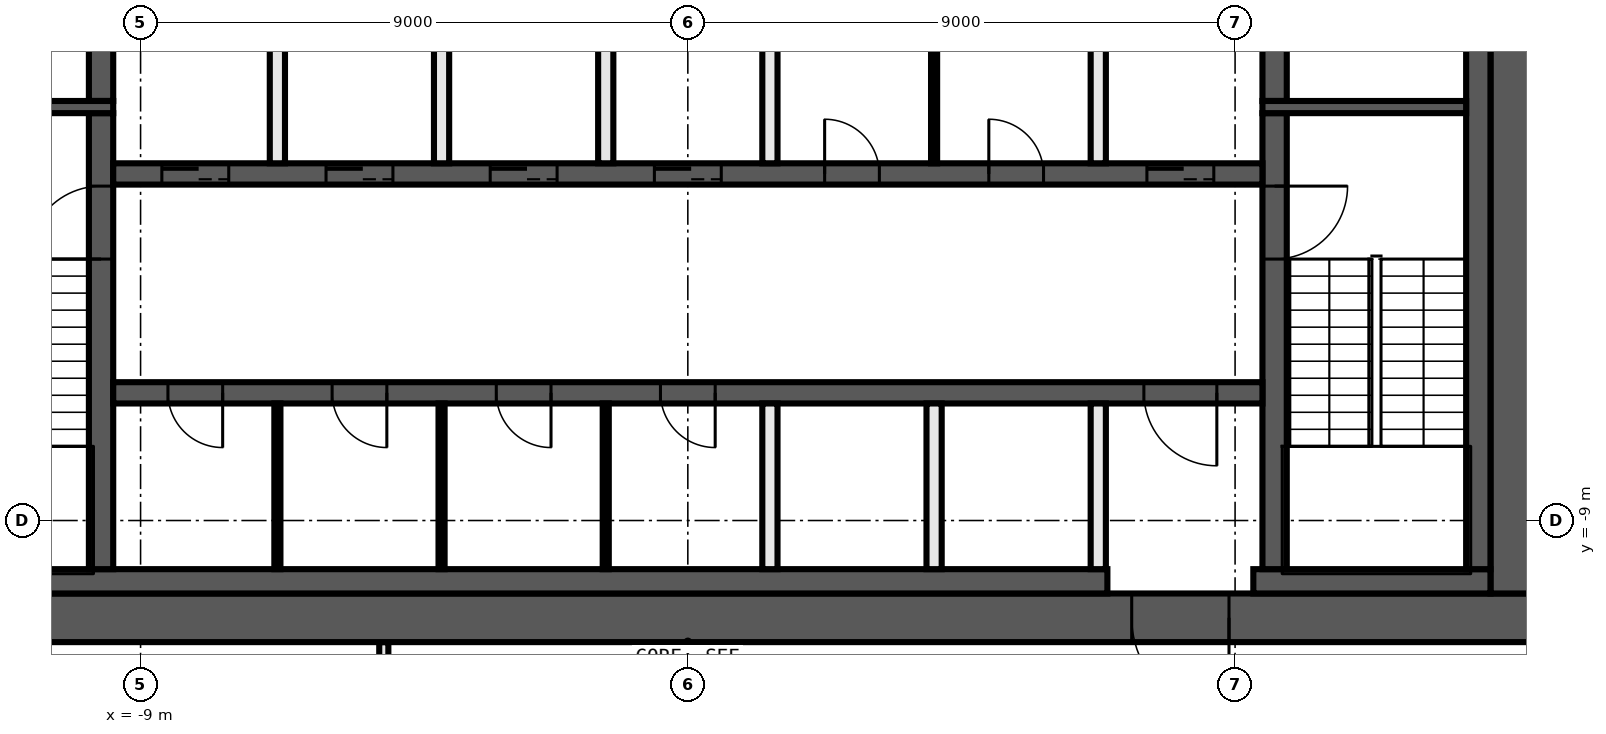
"""IFC4 building model, lengths in metres.
Left out: names, types, materials, properties, quantities, classifications, styles, units other than length and angle.
Written with IfcOpenShell. Run it as: python <this file> out.ifc"""

import sys

from ifc_helpers import new_model, si_unit, direction, frame, frame_2d, origin, place, context, subcontext, project, spatial, rectangle, extrude, element, fill, save


model = new_model("IFC4")
c1 = context("Model", 3, precision=1e-05, world=origin(), true_north=direction((0.0, 1.0)))
c2 = subcontext(c1, "Body", "Model", "MODEL_VIEW")
j1 = project(units=[si_unit("LENGTHUNIT", "METRE"), si_unit("PLANEANGLEUNIT", "RADIAN")], contexts=[c1])
p1 = place(None, origin())
s1 = spatial("IfcSite", under=j1, at=p1, CompositionType="ELEMENT")
p2 = place(p1, origin())
s2 = spatial("IfcBuilding", under=s1, at=p2, CompositionType="ELEMENT")
p3 = place(p2, frame((0.0, 0.0, 207.2)))
s3 = spatial("IfcBuildingStorey", under=s2, at=p3, CompositionType="ELEMENT", Elevation=207.2)
p4 = place(p3, frame((-5.0, -14.125, 0.0), z_axis=(0.0, 0.0, 1.0), x_axis=(0.0, 1.0, 0.0)))
e1 = element("IfcWall", 1, at=p4, inside=s3, PredefinedType="PARTITIONING", context=c2, shape_type="SweptSolid", body=[
    extrude(rectangle(XDim=3.125, YDim=0.15, at=frame_2d((1.562, 0.0))), origin(), (0.0, 0.0, 1.0), 3.82),
])
p5 = place(p3, frame((14.0, -10.6, 0.0), z_axis=(0.0, 0.0, 1.0), x_axis=(-1.0, 0.0, 0.0)))
e2 = element("IfcWall", 2, at=p5, inside=s3, PredefinedType="SHEAR", context=c2, shape_type="SweptSolid", body=[
    extrude(rectangle(XDim=28.0, YDim=0.8, at=frame_2d((14.0, 0.0))), origin(), (0.0, 0.0, 1.0), 3.82),
])
p6 = place(p5, frame((5.1, 0.0, 0.0)))
e3 = element("IfcOpeningElement", 3, at=p6, cuts=e2, PredefinedType="OPENING", context=c2, shape_type="SweptSolid", body=[
    extrude(rectangle(XDim=1.6, YDim=2.1, at=frame_2d((0.8, 1.05))), frame((0.0, 0.41, 0.0), z_axis=(0.0, -1.0, 0.0), x_axis=(1.0, 0.0, 0.0)), (0.0, 0.0, 1.0), 0.82),
])
p7 = place(p3, frame((13.6, 10.2, 0.0), z_axis=(0.0, 0.0, 1.0), x_axis=(0.0, -1.0, 0.0)))
e4 = element("IfcWall", 4, at=p7, inside=s3, PredefinedType="SHEAR", context=c2, shape_type="SweptSolid", body=[
    extrude(rectangle(XDim=20.4, YDim=0.8, at=frame_2d((10.2, 0.0))), origin(), (0.0, 0.0, 1.0), 3.82),
])
p8 = place(p3, frame((13.2, -10.0, 0.0), z_axis=(0.0, 0.0, 1.0), x_axis=(-1.0, 0.0, 0.0)))
e5 = element("IfcWall", 5, at=p8, inside=s3, PredefinedType="SHEAR", context=c2, shape_type="SweptSolid", body=[
    extrude(rectangle(XDim=3.9, YDim=0.4, at=frame_2d((1.95, 0.0))), origin(), (0.0, 0.0, 1.0), 3.82),
])
p9 = place(p3, frame((6.9, -10.0, 0.0), z_axis=(0.0, 0.0, 1.0), x_axis=(-1.0, 0.0, 0.0)))
e6 = element("IfcWall", 6, at=p9, inside=s3, PredefinedType="SHEAR", context=c2, shape_type="SweptSolid", body=[
    extrude(rectangle(XDim=20.1, YDim=0.4, at=frame_2d((10.05, 0.0))), origin(), (0.0, 0.0, 1.0), 3.82),
])
p10 = place(p3, frame((13.0, 9.8, 0.0), z_axis=(0.0, 0.0, 1.0), x_axis=(0.0, -1.0, 0.0)))
e7 = element("IfcWall", 7, at=p10, inside=s3, PredefinedType="SHEAR", context=c2, shape_type="SweptSolid", body=[
    extrude(rectangle(XDim=19.6, YDim=0.4, at=frame_2d((9.8, 0.0))), origin(), (0.0, 0.0, 1.0), 3.82),
])
p11 = place(p3, frame((9.65, -2.3, 0.0), z_axis=(0.0, 0.0, 1.0), x_axis=(0.0, -1.0, 0.0)))
e8 = element("IfcWall", 8, at=p11, inside=s3, PredefinedType="SHEAR", context=c2, shape_type="SweptSolid", body=[
    extrude(rectangle(XDim=7.5, YDim=0.4, at=frame_2d((3.75, 0.0))), origin(), (0.0, 0.0, 1.0), 3.82),
])
p12 = place(p11, frame((1.2, 0.0, 0.0)))
e9 = element("IfcOpeningElement", 9, at=p12, cuts=e8, PredefinedType="OPENING", context=c2, shape_type="SweptSolid", body=[
    extrude(rectangle(XDim=1.2, YDim=2.1, at=frame_2d((0.6, 1.05))), frame((0.0, 0.21, 0.0), z_axis=(0.0, -1.0, 0.0), x_axis=(1.0, 0.0, 0.0)), (0.0, 0.0, 1.0), 0.42),
])
p13 = place(p3, frame((9.65, 2.1, 0.0), z_axis=(0.0, 0.0, 1.0), x_axis=(0.0, -1.0, 0.0)))
e10 = element("IfcWall", 10, at=p13, inside=s3, PredefinedType="SHEAR", context=c2, shape_type="SweptSolid", body=[
    extrude(rectangle(XDim=4.2, YDim=0.4, at=frame_2d((2.1, 0.0))), origin(), (0.0, 0.0, 1.0), 3.82),
])
p14 = place(p13, frame((0.15, 0.0, 0.0)))
e11 = element("IfcOpeningElement", 11, at=p14, cuts=e10, PredefinedType="OPENING", context=c2, shape_type="SweptSolid", body=[
    extrude(rectangle(XDim=0.9, YDim=2.1, at=frame_2d((0.45, 1.05))), frame((0.0, 0.21, 0.0), z_axis=(0.0, -1.0, 0.0), x_axis=(1.0, 0.0, 0.0)), (0.0, 0.0, 1.0), 0.42),
])
p15 = place(p3, frame((-9.65, -9.8, 0.0), z_axis=(0.0, 0.0, 1.0), x_axis=(0.0, 1.0, 0.0)))
e12 = element("IfcWall", 12, at=p15, inside=s3, PredefinedType="SHEAR", context=c2, shape_type="SweptSolid", body=[
    extrude(rectangle(XDim=7.5, YDim=0.4, at=frame_2d((3.75, 0.0))), origin(), (0.0, 0.0, 1.0), 3.82),
])
p16 = place(p15, frame((5.1, 0.0, 0.0)))
e13 = element("IfcOpeningElement", 13, at=p16, cuts=e12, PredefinedType="OPENING", context=c2, shape_type="SweptSolid", body=[
    extrude(rectangle(XDim=1.2, YDim=2.1, at=frame_2d((0.6, 1.05))), frame((0.0, 0.21, 0.0), z_axis=(0.0, -1.0, 0.0), x_axis=(1.0, 0.0, 0.0)), (0.0, 0.0, 1.0), 0.42),
])
p17 = place(p3, frame((-9.65, -2.1, 0.0), z_axis=(0.0, 0.0, 1.0), x_axis=(0.0, 1.0, 0.0)))
e14 = element("IfcWall", 14, at=p17, inside=s3, PredefinedType="SHEAR", context=c2, shape_type="SweptSolid", body=[
    extrude(rectangle(XDim=4.2, YDim=0.4, at=frame_2d((2.1, 0.0))), origin(), (0.0, 0.0, 1.0), 3.82),
])
for number, where, z_axis, x_axis in (
    (15, (9.45, -2.2, 0.0), (0.0, 0.0, 1.0), (1.0, 0.0, 0.0)),
    (16, (-9.45, -2.2, 0.0), (0.0, 0.0, 1.0), (-1.0, 0.0, 0.0)),
):
    element("IfcWall", number, at=place(p3, frame(where, z_axis=z_axis, x_axis=x_axis)), inside=s3, PredefinedType="SHEAR", context=c2, shape_type="SweptSolid", body=[
        extrude(rectangle(XDim=3.35, YDim=0.2, at=frame_2d((1.675, 0.0))), origin(), (0.0, 0.0, 1.0), 3.82),
    ])
p18 = place(p3, frame((-9.45, -3.3, 0.0), z_axis=(0.0, 0.0, 1.0), x_axis=(1.0, 0.0, 0.0)))
e17 = element("IfcWall", 17, at=p18, inside=s3, PredefinedType="SHEAR", context=c2, shape_type="SweptSolid", body=[
    extrude(rectangle(XDim=18.9, YDim=0.35, at=frame_2d((9.45, 0.0))), origin(), (0.0, 0.0, 1.0), 3.82),
])
p19 = place(p18, frame((0.8, 0.0, 0.0)))
e18 = element("IfcOpeningElement", 18, at=p19, cuts=e17, PredefinedType="OPENING", context=c2, shape_type="SweptSolid", body=[
    extrude(rectangle(XDim=1.1, YDim=2.1, at=frame_2d((0.55, 1.05))), frame((0.0, 0.185, 0.0), z_axis=(0.0, -1.0, 0.0), x_axis=(1.0, 0.0, 0.0)), (0.0, 0.0, 1.0), 0.37),
])
p20 = place(p18, frame((3.5, 0.0, 0.0)))
e19 = element("IfcOpeningElement", 19, at=p20, cuts=e17, PredefinedType="OPENING", context=c2, shape_type="SweptSolid", body=[
    extrude(rectangle(XDim=1.1, YDim=2.1, at=frame_2d((0.55, 1.05))), frame((0.0, 0.185, 0.0), z_axis=(0.0, -1.0, 0.0), x_axis=(1.0, 0.0, 0.0)), (0.0, 0.0, 1.0), 0.37),
])
p21 = place(p18, frame((6.2, 0.0, 0.0)))
e20 = element("IfcOpeningElement", 20, at=p21, cuts=e17, PredefinedType="OPENING", context=c2, shape_type="SweptSolid", body=[
    extrude(rectangle(XDim=1.1, YDim=2.1, at=frame_2d((0.55, 1.05))), frame((0.0, 0.185, 0.0), z_axis=(0.0, -1.0, 0.0), x_axis=(1.0, 0.0, 0.0)), (0.0, 0.0, 1.0), 0.37),
])
p22 = place(p18, frame((8.9, 0.0, 0.0)))
e21 = element("IfcOpeningElement", 21, at=p22, cuts=e17, PredefinedType="OPENING", context=c2, shape_type="SweptSolid", body=[
    extrude(rectangle(XDim=1.1, YDim=2.1, at=frame_2d((0.55, 1.05))), frame((0.0, 0.185, 0.0), z_axis=(0.0, -1.0, 0.0), x_axis=(1.0, 0.0, 0.0)), (0.0, 0.0, 1.0), 0.37),
])
p23 = place(p18, frame((17.0, 0.0, 0.0)))
e22 = element("IfcOpeningElement", 22, at=p23, cuts=e17, PredefinedType="OPENING", context=c2, shape_type="SweptSolid", body=[
    extrude(rectangle(XDim=1.1, YDim=2.1, at=frame_2d((0.55, 1.05))), frame((0.0, 0.185, 0.0), z_axis=(0.0, -1.0, 0.0), x_axis=(1.0, 0.0, 0.0)), (0.0, 0.0, 1.0), 0.37),
])
p24 = place(p18, frame((11.7, 0.0, 0.0)))
e23 = element("IfcOpeningElement", 23, at=p24, cuts=e17, PredefinedType="OPENING", context=c2, shape_type="SweptSolid", body=[
    extrude(rectangle(XDim=0.9, YDim=2.1, at=frame_2d((0.45, 1.05))), frame((0.0, 0.185, 0.0), z_axis=(0.0, -1.0, 0.0), x_axis=(1.0, 0.0, 0.0)), (0.0, 0.0, 1.0), 0.37),
])
p25 = place(p18, frame((14.4, 0.0, 0.0)))
e24 = element("IfcOpeningElement", 24, at=p25, cuts=e17, PredefinedType="OPENING", context=c2, shape_type="SweptSolid", body=[
    extrude(rectangle(XDim=0.9, YDim=2.1, at=frame_2d((0.45, 1.05))), frame((0.0, 0.185, 0.0), z_axis=(0.0, -1.0, 0.0), x_axis=(1.0, 0.0, 0.0)), (0.0, 0.0, 1.0), 0.37),
])
p26 = place(p3, frame((9.45, -6.9, 0.0), z_axis=(0.0, 0.0, 1.0), x_axis=(-1.0, 0.0, 0.0)))
e25 = element("IfcWall", 25, at=p26, inside=s3, PredefinedType="SHEAR", context=c2, shape_type="SweptSolid", body=[
    extrude(rectangle(XDim=18.9, YDim=0.35, at=frame_2d((9.45, 0.0))), origin(), (0.0, 0.0, 1.0), 3.82),
])
p27 = place(p26, frame((0.75, 0.0, 0.0)))
e26 = element("IfcOpeningElement", 26, at=p27, cuts=e25, PredefinedType="OPENING", context=c2, shape_type="SweptSolid", body=[
    extrude(rectangle(XDim=1.2, YDim=2.1, at=frame_2d((0.6, 1.05))), frame((0.0, 0.185, 0.0), z_axis=(0.0, -1.0, 0.0), x_axis=(1.0, 0.0, 0.0)), (0.0, 0.0, 1.0), 0.37),
])
p28 = place(p26, frame((17.1, 0.0, 0.0)))
e27 = element("IfcOpeningElement", 27, at=p28, cuts=e25, PredefinedType="OPENING", context=c2, shape_type="SweptSolid", body=[
    extrude(rectangle(XDim=0.9, YDim=2.1, at=frame_2d((0.45, 1.05))), frame((0.0, 0.185, 0.0), z_axis=(0.0, -1.0, 0.0), x_axis=(1.0, 0.0, 0.0)), (0.0, 0.0, 1.0), 0.37),
])
p29 = place(p26, frame((14.4, 0.0, 0.0)))
e28 = element("IfcOpeningElement", 28, at=p29, cuts=e25, PredefinedType="OPENING", context=c2, shape_type="SweptSolid", body=[
    extrude(rectangle(XDim=0.9, YDim=2.1, at=frame_2d((0.45, 1.05))), frame((0.0, 0.185, 0.0), z_axis=(0.0, -1.0, 0.0), x_axis=(1.0, 0.0, 0.0)), (0.0, 0.0, 1.0), 0.37),
])
p30 = place(p26, frame((11.7, 0.0, 0.0)))
e29 = element("IfcOpeningElement", 29, at=p30, cuts=e25, PredefinedType="OPENING", context=c2, shape_type="SweptSolid", body=[
    extrude(rectangle(XDim=0.9, YDim=2.1, at=frame_2d((0.45, 1.05))), frame((0.0, 0.185, 0.0), z_axis=(0.0, -1.0, 0.0), x_axis=(1.0, 0.0, 0.0)), (0.0, 0.0, 1.0), 0.37),
])
p31 = place(p26, frame((9.0, 0.0, 0.0)))
e30 = element("IfcOpeningElement", 30, at=p31, cuts=e25, PredefinedType="OPENING", context=c2, shape_type="SweptSolid", body=[
    extrude(rectangle(XDim=0.9, YDim=2.1, at=frame_2d((0.45, 1.05))), frame((0.0, 0.185, 0.0), z_axis=(0.0, -1.0, 0.0), x_axis=(1.0, 0.0, 0.0)), (0.0, 0.0, 1.0), 0.37),
])
for number, where, z_axis, x_axis in (
    (31, (6.75, -9.8, 0.0), (0.0, 0.0, 1.0), (0.0, 1.0, 0.0)),
    (32, (6.75, -3.125, 0.0), (0.0, 0.0, 1.0), (0.0, 1.0, 0.0)),
):
    element("IfcWall", number, at=place(p3, frame(where, z_axis=z_axis, x_axis=x_axis)), inside=s3, PredefinedType="SOLIDWALL", context=c2, shape_type="SweptSolid", body=[
        extrude(rectangle(XDim=2.725, YDim=0.25, at=frame_2d((1.363, 0.0))), origin(), (0.0, 0.0, 1.0), 3.82),
    ])
p32 = place(p3, frame((4.05, -3.125, 0.0), z_axis=(0.0, 0.0, 1.0), x_axis=(0.0, 1.0, 0.0)))
e33 = element("IfcWall", 33, at=p32, inside=s3, PredefinedType="PARTITIONING", context=c2, shape_type="SweptSolid", body=[
    extrude(rectangle(XDim=2.725, YDim=0.1, at=frame_2d((1.363, 0.0))), origin(), (0.0, 0.0, 1.0), 3.82),
])
for number, where, z_axis, x_axis in (
    (34, (4.05, -9.8, 0.0), (0.0, 0.0, 1.0), (0.0, 1.0, 0.0)),
    (35, (1.35, -9.8, 0.0), (0.0, 0.0, 1.0), (0.0, 1.0, 0.0)),
    (36, (1.35, -3.125, 0.0), (0.0, 0.0, 1.0), (0.0, 1.0, 0.0)),
):
    element("IfcWall", number, at=place(p3, frame(where, z_axis=z_axis, x_axis=x_axis)), inside=s3, PredefinedType="SOLIDWALL", context=c2, shape_type="SweptSolid", body=[
        extrude(rectangle(XDim=2.725, YDim=0.25, at=frame_2d((1.363, 0.0))), origin(), (0.0, 0.0, 1.0), 3.82),
    ])
p33 = place(p3, frame((-1.35, -9.8, 0.0), z_axis=(0.0, 0.0, 1.0), x_axis=(0.0, 1.0, 0.0)))
e37 = element("IfcWall", 37, at=p33, inside=s3, PredefinedType="PARTITIONING", context=c2, shape_type="SweptSolid", body=[
    extrude(rectangle(XDim=2.725, YDim=0.1, at=frame_2d((1.363, 0.0))), origin(), (0.0, 0.0, 1.0), 3.82),
])
p34 = place(p3, frame((-1.35, -3.125, 0.0), z_axis=(0.0, 0.0, 1.0), x_axis=(0.0, 1.0, 0.0)))
e38 = element("IfcWall", 38, at=p34, inside=s3, PredefinedType="SOLIDWALL", context=c2, shape_type="SweptSolid", body=[
    extrude(rectangle(XDim=2.725, YDim=0.25, at=frame_2d((1.363, 0.0))), origin(), (0.0, 0.0, 1.0), 3.82),
])
p35 = place(p3, frame((-4.05, -9.8, 0.0), z_axis=(0.0, 0.0, 1.0), x_axis=(0.0, 1.0, 0.0)))
e39 = element("IfcWall", 39, at=p35, inside=s3, PredefinedType="PARTITIONING", context=c2, shape_type="SweptSolid", body=[
    extrude(rectangle(XDim=2.725, YDim=0.1, at=frame_2d((1.363, 0.0))), origin(), (0.0, 0.0, 1.0), 3.82),
])
p36 = place(p3, frame((-4.05, -3.125, 0.0), z_axis=(0.0, 0.0, 1.0), x_axis=(0.0, 1.0, 0.0)))
e40 = element("IfcWall", 40, at=p36, inside=s3, PredefinedType="SOLIDWALL", context=c2, shape_type="SweptSolid", body=[
    extrude(rectangle(XDim=2.725, YDim=0.25, at=frame_2d((1.363, 0.0))), origin(), (0.0, 0.0, 1.0), 3.82),
])
p37 = place(p3, frame((-6.75, -9.8, 0.0), z_axis=(0.0, 0.0, 1.0), x_axis=(0.0, 1.0, 0.0)))
e41 = element("IfcWall", 41, at=p37, inside=s3, PredefinedType="PARTITIONING", context=c2, shape_type="SweptSolid", body=[
    extrude(rectangle(XDim=2.725, YDim=0.1, at=frame_2d((1.363, 0.0))), origin(), (0.0, 0.0, 1.0), 3.82),
])
p38 = place(p3, frame((-6.75, -3.125, 0.0), z_axis=(0.0, 0.0, 1.0), x_axis=(0.0, 1.0, 0.0)))
e42 = element("IfcWall", 42, at=p38, inside=s3, PredefinedType="SOLIDWALL", context=c2, shape_type="SweptSolid", body=[
    extrude(rectangle(XDim=2.725, YDim=0.25, at=frame_2d((1.363, 0.0))), origin(), (0.0, 0.0, 1.0), 3.82),
])
p39 = place(p19, origin())
e43 = element("IfcDoor", 43, at=p39, inside=s3, OperationType="DOUBLE_DOOR_SLIDING", PredefinedType="DOOR", context=c2, shape_type="SweptSolid", body=[
    extrude(rectangle(XDim=1.1, YDim=2.1, at=frame_2d((0.55, 1.05))), frame((0.0, 0.025, 0.0), z_axis=(0.0, -1.0, 0.0), x_axis=(1.0, 0.0, 0.0)), (0.0, 0.0, 1.0), 0.05),
])
fill(e18, e43)
p40 = place(p20, origin())
e44 = element("IfcDoor", 44, at=p40, inside=s3, OperationType="DOUBLE_DOOR_SLIDING", PredefinedType="DOOR", context=c2, shape_type="SweptSolid", body=[
    extrude(rectangle(XDim=1.1, YDim=2.1, at=frame_2d((0.55, 1.05))), frame((0.0, 0.025, 0.0), z_axis=(0.0, -1.0, 0.0), x_axis=(1.0, 0.0, 0.0)), (0.0, 0.0, 1.0), 0.05),
])
fill(e19, e44)
p41 = place(p21, origin())
e45 = element("IfcDoor", 45, at=p41, inside=s3, OperationType="DOUBLE_DOOR_SLIDING", PredefinedType="DOOR", context=c2, shape_type="SweptSolid", body=[
    extrude(rectangle(XDim=1.1, YDim=2.1, at=frame_2d((0.55, 1.05))), frame((0.0, 0.025, 0.0), z_axis=(0.0, -1.0, 0.0), x_axis=(1.0, 0.0, 0.0)), (0.0, 0.0, 1.0), 0.05),
])
fill(e20, e45)
p42 = place(p22, origin())
e46 = element("IfcDoor", 46, at=p42, inside=s3, OperationType="DOUBLE_DOOR_SLIDING", PredefinedType="DOOR", context=c2, shape_type="SweptSolid", body=[
    extrude(rectangle(XDim=1.1, YDim=2.1, at=frame_2d((0.55, 1.05))), frame((0.0, 0.025, 0.0), z_axis=(0.0, -1.0, 0.0), x_axis=(1.0, 0.0, 0.0)), (0.0, 0.0, 1.0), 0.05),
])
fill(e21, e46)
p43 = place(p23, origin())
e47 = element("IfcDoor", 47, at=p43, inside=s3, OperationType="DOUBLE_DOOR_SLIDING", PredefinedType="DOOR", context=c2, shape_type="SweptSolid", body=[
    extrude(rectangle(XDim=1.1, YDim=2.1, at=frame_2d((0.55, 1.05))), frame((0.0, 0.025, 0.0), z_axis=(0.0, -1.0, 0.0), x_axis=(1.0, 0.0, 0.0)), (0.0, 0.0, 1.0), 0.05),
])
fill(e22, e47)
p44 = place(p6, origin())
e48 = element("IfcDoor", 48, at=p44, inside=s3, OperationType="DOUBLE_DOOR_SINGLE_SWING", PredefinedType="DOOR", context=c2, shape_type="SweptSolid", body=[
    extrude(rectangle(XDim=1.6, YDim=2.1, at=frame_2d((0.8, 1.05))), frame((0.0, 0.025, 0.0), z_axis=(0.0, -1.0, 0.0), x_axis=(1.0, 0.0, 0.0)), (0.0, 0.0, 1.0), 0.05),
])
fill(e3, e48)
p45 = place(p27, origin())
e49 = element("IfcDoor", 49, at=p45, inside=s3, OperationType="SINGLE_SWING_LEFT", PredefinedType="DOOR", context=c2, shape_type="SweptSolid", body=[
    extrude(rectangle(XDim=1.2, YDim=2.1, at=frame_2d((0.6, 1.05))), frame((0.0, 0.025, 0.0), z_axis=(0.0, -1.0, 0.0), x_axis=(1.0, 0.0, 0.0)), (0.0, 0.0, 1.0), 0.05),
])
fill(e26, e49)
p46 = place(p24, origin())
e50 = element("IfcDoor", 50, at=p46, inside=s3, OperationType="SINGLE_SWING_LEFT", PredefinedType="DOOR", context=c2, shape_type="SweptSolid", body=[
    extrude(rectangle(XDim=0.9, YDim=2.1, at=frame_2d((0.45, 1.05))), frame((0.0, 0.025, 0.0), z_axis=(0.0, -1.0, 0.0), x_axis=(1.0, 0.0, 0.0)), (0.0, 0.0, 1.0), 0.05),
])
fill(e23, e50)
p47 = place(p25, origin())
e51 = element("IfcDoor", 51, at=p47, inside=s3, OperationType="SINGLE_SWING_RIGHT", PredefinedType="DOOR", context=c2, shape_type="SweptSolid", body=[
    extrude(rectangle(XDim=0.9, YDim=2.1, at=frame_2d((0.45, 1.05))), frame((0.0, 0.025, 0.0), z_axis=(0.0, -1.0, 0.0), x_axis=(1.0, 0.0, 0.0)), (0.0, 0.0, 1.0), 0.05),
])
fill(e24, e51)
p48 = place(p28, origin())
e52 = element("IfcDoor", 52, at=p48, inside=s3, OperationType="SINGLE_SWING_LEFT", PredefinedType="DOOR", context=c2, shape_type="SweptSolid", body=[
    extrude(rectangle(XDim=0.9, YDim=2.1, at=frame_2d((0.45, 1.05))), frame((0.0, 0.025, 0.0), z_axis=(0.0, -1.0, 0.0), x_axis=(1.0, 0.0, 0.0)), (0.0, 0.0, 1.0), 0.05),
])
fill(e27, e52)
p49 = place(p29, origin())
e53 = element("IfcDoor", 53, at=p49, inside=s3, OperationType="SINGLE_SWING_RIGHT", PredefinedType="DOOR", context=c2, shape_type="SweptSolid", body=[
    extrude(rectangle(XDim=0.9, YDim=2.1, at=frame_2d((0.45, 1.05))), frame((0.0, 0.025, 0.0), z_axis=(0.0, -1.0, 0.0), x_axis=(1.0, 0.0, 0.0)), (0.0, 0.0, 1.0), 0.05),
])
fill(e28, e53)
p50 = place(p30, origin())
e54 = element("IfcDoor", 54, at=p50, inside=s3, OperationType="SINGLE_SWING_LEFT", PredefinedType="DOOR", context=c2, shape_type="SweptSolid", body=[
    extrude(rectangle(XDim=0.9, YDim=2.1, at=frame_2d((0.45, 1.05))), frame((0.0, 0.025, 0.0), z_axis=(0.0, -1.0, 0.0), x_axis=(1.0, 0.0, 0.0)), (0.0, 0.0, 1.0), 0.05),
])
fill(e29, e54)
p51 = place(p31, origin())
e55 = element("IfcDoor", 55, at=p51, inside=s3, OperationType="SINGLE_SWING_RIGHT", PredefinedType="DOOR", context=c2, shape_type="SweptSolid", body=[
    extrude(rectangle(XDim=0.9, YDim=2.1, at=frame_2d((0.45, 1.05))), frame((0.0, 0.025, 0.0), z_axis=(0.0, -1.0, 0.0), x_axis=(1.0, 0.0, 0.0)), (0.0, 0.0, 1.0), 0.05),
])
fill(e30, e55)
p52 = place(p12, origin())
e56 = element("IfcDoor", 56, at=p52, inside=s3, OperationType="SINGLE_SWING_RIGHT", PredefinedType="DOOR", context=c2, shape_type="SweptSolid", body=[
    extrude(rectangle(XDim=1.2, YDim=2.1, at=frame_2d((0.6, 1.05))), frame((0.0, 0.025, 0.0), z_axis=(0.0, -1.0, 0.0), x_axis=(1.0, 0.0, 0.0)), (0.0, 0.0, 1.0), 0.05),
])
fill(e9, e56)
p53 = place(p16, origin())
e57 = element("IfcDoor", 57, at=p53, inside=s3, OperationType="SINGLE_SWING_LEFT", PredefinedType="DOOR", context=c2, shape_type="SweptSolid", body=[
    extrude(rectangle(XDim=1.2, YDim=2.1, at=frame_2d((0.6, 1.05))), frame((0.0, 0.025, 0.0), z_axis=(0.0, -1.0, 0.0), x_axis=(1.0, 0.0, 0.0)), (0.0, 0.0, 1.0), 0.05),
])
fill(e13, e57)
save(model, sys.argv[1])
